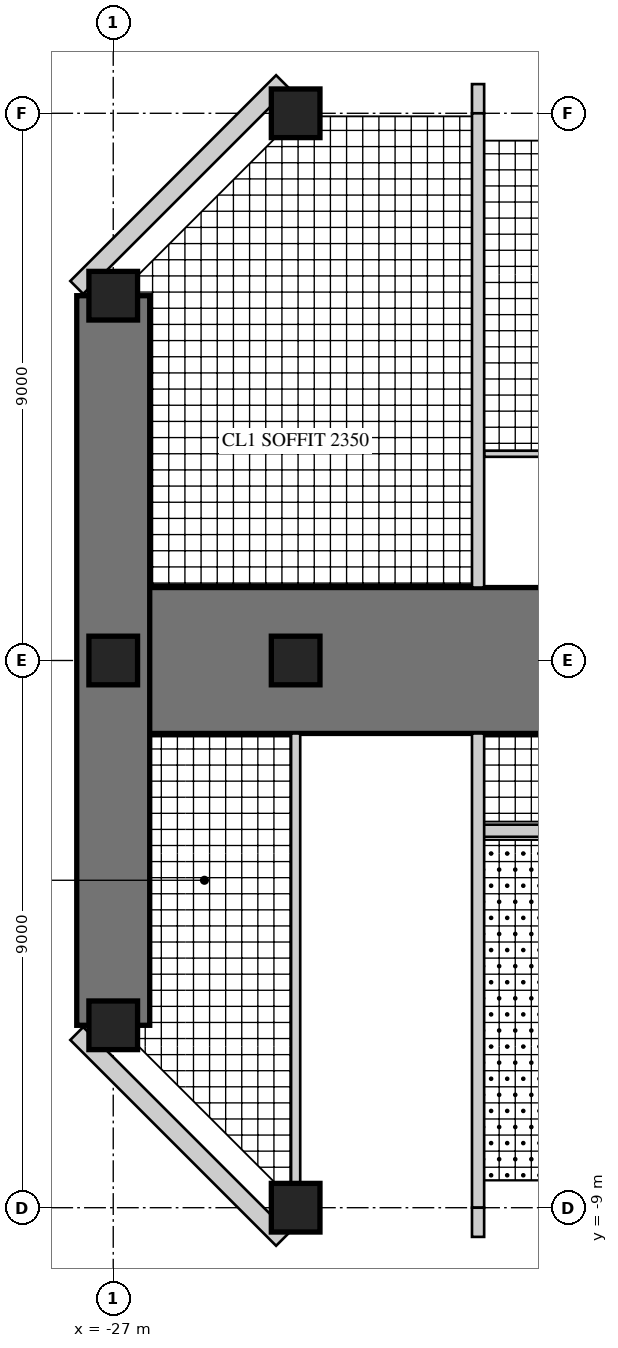
"""IFC4 building model, lengths in metres.
Left out: names, types, materials, properties, quantities, classifications, styles, units other than length and angle.
Written with IfcOpenShell. Run it as: python <this file> out.ifc"""

import sys

from ifc_helpers import new_model, si_unit, direction, frame, frame_2d, origin, origin_2d, place, context, subcontext, project, spatial, rectangle, hollow_rectangle, extrude, element, fill, save


model = new_model("IFC4")
c1 = context("Model", 3, precision=1e-05, world=origin(), true_north=direction((0.0, 1.0)))
c2 = subcontext(c1, "Body", "Model", "MODEL_VIEW")
j1 = project(units=[si_unit("LENGTHUNIT", "METRE"), si_unit("PLANEANGLEUNIT", "RADIAN")], contexts=[c1])
p1 = place(None, origin())
s1 = spatial("IfcSite", under=j1, at=p1, CompositionType="ELEMENT")
p2 = place(p1, origin())
s2 = spatial("IfcBuilding", under=s1, at=p2, CompositionType="ELEMENT")
p3 = place(p2, frame((0.0, 0.0, 242.5)))
s3 = spatial("IfcBuildingStorey", under=s2, at=p3, CompositionType="ELEMENT", Elevation=242.5)
p4 = place(p3, frame((-13.05, 0.0, 0.0), z_axis=(0.0, 0.0, 1.0), x_axis=(-1.0, 0.0, 0.0)))
e1 = element("IfcWall", 1, at=p4, inside=s3, PredefinedType="SHEAR", context=c2, shape_type="SweptSolid", body=[
    extrude(rectangle(XDim=13.95, YDim=2.4, at=frame_2d((6.975, 0.0))), origin(), (0.0, 0.0, 1.0), 3.4),
])
p5 = place(p4, frame((0.3, 0.0, 0.0)))
e2 = element("IfcOpeningElement", 2, at=p5, cuts=e1, PredefinedType="OPENING", context=c2, shape_type="SweptSolid", body=[
    extrude(rectangle(XDim=1.0, YDim=2.15, at=frame_2d((0.5, 1.075))), frame((0.0, 1.21, 0.0), z_axis=(0.0, -1.0, 0.0), x_axis=(1.0, 0.0, 0.0)), (0.0, 0.0, 1.0), 2.42),
])
p6 = place(p4, frame((2.55, 0.0, 0.0)))
e3 = element("IfcOpeningElement", 3, at=p6, cuts=e1, PredefinedType="OPENING", context=c2, shape_type="SweptSolid", body=[
    extrude(rectangle(XDim=1.0, YDim=2.15, at=frame_2d((0.5, 1.075))), frame((0.0, 1.21, 0.0), z_axis=(0.0, -1.0, 0.0), x_axis=(1.0, 0.0, 0.0)), (0.0, 0.0, 1.0), 2.42),
])
p7 = place(p4, frame((9.25, 0.0, 0.0)))
e4 = element("IfcOpeningElement", 4, at=p7, cuts=e1, PredefinedType="OPENING", context=c2, shape_type="SweptSolid", body=[
    extrude(rectangle(XDim=1.0, YDim=2.2, at=frame_2d((0.5, 1.1))), frame((0.0, 1.21, 0.0), z_axis=(0.0, -1.0, 0.0), x_axis=(1.0, 0.0, 0.0)), (0.0, 0.0, 1.0), 2.42),
])
p8 = place(p3, frame((-27.0, 6.0, 0.0), z_axis=(0.0, 0.0, 1.0), x_axis=(0.0, -1.0, 0.0)))
e5 = element("IfcWall", 5, at=p8, inside=s3, PredefinedType="SHEAR", context=c2, shape_type="SweptSolid", body=[
    extrude(rectangle(XDim=12.0, YDim=1.2, at=frame_2d((6.0, 0.0))), origin(), (0.0, 0.0, 1.0), 3.4),
])
p9 = place(p8, frame((1.2, 0.0, 0.6)))
e6 = element("IfcOpeningElement", 6, at=p9, cuts=e5, PredefinedType="OPENING", context=c2, shape_type="SweptSolid", body=[
    extrude(rectangle(XDim=3.0, YDim=2.4, at=frame_2d((1.5, 1.2))), frame((0.0, 0.61, 0.0), z_axis=(0.0, -1.0, 0.0), x_axis=(1.0, 0.0, 0.0)), (0.0, 0.0, 1.0), 1.22),
])
p10 = place(p8, frame((7.8, 0.0, 0.6)))
e7 = element("IfcOpeningElement", 7, at=p10, cuts=e5, PredefinedType="OPENING", context=c2, shape_type="SweptSolid", body=[
    extrude(rectangle(XDim=3.0, YDim=2.4, at=frame_2d((1.5, 1.2))), frame((0.0, 0.61, 0.0), z_axis=(0.0, -1.0, 0.0), x_axis=(1.0, 0.0, 0.0)), (0.0, 0.0, 1.0), 1.22),
])
for number, where, z_axis, x_axis in (
    (8, (-24.0, 9.0, 0.0), (0.0, 0.0, 1.0), (1.0, 0.0, 0.0)),
    (9, (-24.0, -9.0, 0.0), (0.0, 0.0, 1.0), (1.0, 0.0, 0.0)),
    (10, (-27.0, 6.0, 0.0), (0.0, 0.0, 1.0), (1.0, 0.0, 0.0)),
    (11, (-27.0, 0.0, 0.0), (0.0, 0.0, 1.0), (1.0, 0.0, 0.0)),
    (12, (-27.0, -6.0, 0.0), (0.0, 0.0, 1.0), (1.0, 0.0, 0.0)),
    (13, (-24.0, 0.0, 0.0), (0.0, 0.0, 1.0), (1.0, 0.0, 0.0)),
):
    element("IfcColumn", number, at=place(p3, frame(where, z_axis=z_axis, x_axis=x_axis)), inside=s3, PredefinedType="COLUMN", context=c2, shape_type="SweptSolid", body=[
        extrude(rectangle(XDim=0.8, YDim=0.8, at=origin_2d()), origin(), (0.0, 0.0, 1.0), 3.4),
    ])
p11 = place(p3, frame((-24.215, 9.52, 0.0), z_axis=(0.0, 0.0, 1.0), x_axis=(-0.707132283189, -0.707081278264, 0.0)))
e14 = element("IfcWall", 14, at=p11, inside=s3, PredefinedType="SOLIDWALL", context=c2, shape_type="SweptSolid", body=[
    extrude(rectangle(XDim=4.787, YDim=0.3, at=frame_2d((2.393, 0.0))), origin(), (0.0, 0.0, 1.0), 3.22),
])
p12 = place(p11, frame((1.943, 0.0, 0.3)))
e15 = element("IfcOpeningElement", 15, at=p12, cuts=e14, PredefinedType="OPENING", context=c2, shape_type="SweptSolid", body=[
    extrude(rectangle(XDim=0.9, YDim=2.4, at=frame_2d((0.45, 1.2))), frame((0.0, 0.16, 0.0), z_axis=(0.0, -1.0, 0.0), x_axis=(1.0, 0.0, 0.0)), (0.0, 0.0, 1.0), 0.32),
])
p13 = place(p3, frame((-27.6, -6.135, 0.0), z_axis=(0.0, 0.0, 1.0), x_axis=(0.707132283189, -0.707081278264, 0.0)))
e16 = element("IfcWall", 16, at=p13, inside=s3, PredefinedType="SOLIDWALL", context=c2, shape_type="SweptSolid", body=[
    extrude(rectangle(XDim=4.787, YDim=0.3, at=frame_2d((2.393, 0.0))), origin(), (0.0, 0.0, 1.0), 3.22),
])
p14 = place(p13, frame((1.943, 0.0, 0.3)))
e17 = element("IfcOpeningElement", 17, at=p14, cuts=e16, PredefinedType="OPENING", context=c2, shape_type="SweptSolid", body=[
    extrude(rectangle(XDim=0.9, YDim=2.4, at=frame_2d((0.45, 1.2))), frame((0.0, 0.16, 0.0), z_axis=(0.0, -1.0, 0.0), x_axis=(1.0, 0.0, 0.0)), (0.0, 0.0, 1.0), 0.32),
])
p15 = place(p3, frame((-18.4, 3.4, 0.0), z_axis=(0.0, 0.0, 1.0), x_axis=(-1.0, 0.0, 0.0)))
e18 = element("IfcWall", 18, at=p15, inside=s3, PredefinedType="PARTITIONING", context=c2, shape_type="SweptSolid", body=[
    extrude(rectangle(XDim=2.5, YDim=0.1, at=frame_2d((1.25, 0.0))), origin(), (0.0, 0.0, 1.0), 3.22),
])
p16 = place(p3, frame((-9.4, -2.8, 0.0), z_axis=(0.0, 0.0, 1.0), x_axis=(-1.0, 0.0, 0.0)))
e19 = element("IfcWall", 19, at=p16, inside=s3, PredefinedType="SOLIDWALL", context=c2, shape_type="SweptSolid", body=[
    extrude(rectangle(XDim=11.6, YDim=0.2, at=frame_2d((5.8, 0.0))), origin(), (0.0, 0.0, 1.0), 3.22),
])
p17 = place(p16, frame((3.4, 0.0, 0.0)))
e20 = element("IfcOpeningElement", 20, at=p17, cuts=e19, PredefinedType="OPENING", context=c2, shape_type="SweptSolid", body=[
    extrude(rectangle(XDim=1.0, YDim=2.15, at=frame_2d((0.5, 1.075))), frame((0.0, 0.11, 0.0), z_axis=(0.0, -1.0, 0.0), x_axis=(1.0, 0.0, 0.0)), (0.0, 0.0, 1.0), 0.22),
])
p18 = place(p16, frame((6.8, 0.0, 0.0)))
e21 = element("IfcOpeningElement", 21, at=p18, cuts=e19, PredefinedType="OPENING", context=c2, shape_type="SweptSolid", body=[
    extrude(rectangle(XDim=1.0, YDim=2.2, at=frame_2d((0.5, 1.1))), frame((0.0, 0.11, 0.0), z_axis=(0.0, -1.0, 0.0), x_axis=(1.0, 0.0, 0.0)), (0.0, 0.0, 1.0), 0.22),
])
p19 = place(p3, frame((-24.0, -1.2, 0.0), z_axis=(0.0, 0.0, 1.0), x_axis=(0.0, -1.0, 0.0)))
e22 = element("IfcWall", 22, at=p19, inside=s3, PredefinedType="PARTITIONING", context=c2, shape_type="SweptSolid", body=[
    extrude(rectangle(XDim=7.4, YDim=0.15, at=frame_2d((3.7, 0.0))), origin(), (0.0, 0.0, 1.0), 2.52),
])
p20 = place(p19, frame((1.2, 0.0, 0.0)))
e23 = element("IfcOpeningElement", 23, at=p20, cuts=e22, PredefinedType="OPENING", context=c2, shape_type="SweptSolid", body=[
    extrude(rectangle(XDim=1.0, YDim=2.2, at=frame_2d((0.5, 1.1))), frame((0.0, 0.085, 0.0), z_axis=(0.0, -1.0, 0.0), x_axis=(1.0, 0.0, 0.0)), (0.0, 0.0, 1.0), 0.17),
])
p21 = place(p3, frame((-21.0, 9.48, 0.0), z_axis=(0.0, 0.0, 1.0), x_axis=(0.0, -1.0, 0.0)))
e24 = element("IfcWall", 24, at=p21, inside=s3, PredefinedType="SOLIDWALL", context=c2, shape_type="SweptSolid", body=[
    extrude(rectangle(XDim=0.48, YDim=0.2, at=frame_2d((0.24, 0.0))), origin(), (0.0, 0.0, 1.0), 3.22),
])
p22 = place(p3, frame((-21.0, 9.0, 0.0), z_axis=(0.0, 0.0, 1.0), x_axis=(0.0, -1.0, 0.0)))
e25 = element("IfcWall", 25, at=p22, inside=s3, PredefinedType="SOLIDWALL", context=c2, shape_type="SweptSolid", body=[
    extrude(rectangle(XDim=7.8, YDim=0.2, at=frame_2d((3.9, 0.0))), origin(), (0.0, 0.0, 1.0), 2.67),
])
p23 = place(p3, frame((-21.0, -1.2, 0.0), z_axis=(0.0, 0.0, 1.0), x_axis=(0.0, -1.0, 0.0)))
e26 = element("IfcWall", 26, at=p23, inside=s3, PredefinedType="SOLIDWALL", context=c2, shape_type="SweptSolid", body=[
    extrude(rectangle(XDim=7.8, YDim=0.2, at=frame_2d((3.9, 0.0))), origin(), (0.0, 0.0, 1.0), 2.67),
])
p24 = place(p23, frame((0.35, 0.0, 0.0)))
e27 = element("IfcOpeningElement", 27, at=p24, cuts=e26, PredefinedType="OPENING", context=c2, shape_type="SweptSolid", body=[
    extrude(rectangle(XDim=1.0, YDim=2.2, at=frame_2d((0.5, 1.1))), frame((0.0, 0.11, 0.0), z_axis=(0.0, -1.0, 0.0), x_axis=(1.0, 0.0, 0.0)), (0.0, 0.0, 1.0), 0.22),
])
p25 = place(p3, frame((-21.0, -9.0, 0.0), z_axis=(0.0, 0.0, 1.0), x_axis=(0.0, -1.0, 0.0)))
e28 = element("IfcWall", 28, at=p25, inside=s3, PredefinedType="SOLIDWALL", context=c2, shape_type="SweptSolid", body=[
    extrude(rectangle(XDim=0.48, YDim=0.2, at=frame_2d((0.24, 0.0))), origin(), (0.0, 0.0, 1.0), 3.22),
])
p26 = place(p12, origin())
e29 = element("IfcWindow", 29, at=p26, inside=s3, PartitioningType="SINGLE_PANEL", PredefinedType="WINDOW", context=c2, shape_type="SweptSolid", body=[
    extrude(hollow_rectangle(XDim=0.9, YDim=2.4, WallThickness=0.06, at=frame_2d((0.45, 1.2))), frame((0.0, 0.03, 0.0), z_axis=(0.0, -1.0, 0.0), x_axis=(1.0, 0.0, 0.0)), (0.0, 0.0, 1.0), 0.06),
    extrude(rectangle(XDim=0.779, YDim=2.279, at=frame_2d((0.45, 1.2))), frame((0.0, 0.03, 0.0), z_axis=(0.0, -1.0, 0.0), x_axis=(1.0, 0.0, 0.0)), (0.0, 0.0, 1.0), 0.06),
])
fill(e15, e29)
p27 = place(p9, origin())
e30 = element("IfcWindow", 30, at=p27, inside=s3, PartitioningType="SINGLE_PANEL", PredefinedType="WINDOW", context=c2, shape_type="SweptSolid", body=[
    extrude(hollow_rectangle(XDim=3.0, YDim=2.4, WallThickness=0.06, at=frame_2d((1.5, 1.2))), frame((0.0, 0.03, 0.0), z_axis=(0.0, -1.0, 0.0), x_axis=(1.0, 0.0, 0.0)), (0.0, 0.0, 1.0), 0.06),
    extrude(rectangle(XDim=2.879, YDim=2.279, at=frame_2d((1.5, 1.2))), frame((0.0, 0.03, 0.0), z_axis=(0.0, -1.0, 0.0), x_axis=(1.0, 0.0, 0.0)), (0.0, 0.0, 1.0), 0.06),
])
fill(e6, e30)
p28 = place(p10, origin())
e31 = element("IfcWindow", 31, at=p28, inside=s3, PartitioningType="SINGLE_PANEL", PredefinedType="WINDOW", context=c2, shape_type="SweptSolid", body=[
    extrude(hollow_rectangle(XDim=3.0, YDim=2.4, WallThickness=0.06, at=frame_2d((1.5, 1.2))), frame((0.0, 0.03, 0.0), z_axis=(0.0, -1.0, 0.0), x_axis=(1.0, 0.0, 0.0)), (0.0, 0.0, 1.0), 0.06),
    extrude(rectangle(XDim=2.879, YDim=2.279, at=frame_2d((1.5, 1.2))), frame((0.0, 0.03, 0.0), z_axis=(0.0, -1.0, 0.0), x_axis=(1.0, 0.0, 0.0)), (0.0, 0.0, 1.0), 0.06),
])
fill(e7, e31)
p29 = place(p14, origin())
e32 = element("IfcWindow", 32, at=p29, inside=s3, PartitioningType="SINGLE_PANEL", PredefinedType="WINDOW", context=c2, shape_type="SweptSolid", body=[
    extrude(hollow_rectangle(XDim=0.9, YDim=2.4, WallThickness=0.06, at=frame_2d((0.45, 1.2))), frame((0.0, 0.03, 0.0), z_axis=(0.0, -1.0, 0.0), x_axis=(1.0, 0.0, 0.0)), (0.0, 0.0, 1.0), 0.06),
    extrude(rectangle(XDim=0.779, YDim=2.279, at=frame_2d((0.45, 1.2))), frame((0.0, 0.03, 0.0), z_axis=(0.0, -1.0, 0.0), x_axis=(1.0, 0.0, 0.0)), (0.0, 0.0, 1.0), 0.06),
])
fill(e17, e32)
p30 = place(p20, frame((1.0, 0.0, 0.0), z_axis=(0.0, 0.0, 1.0), x_axis=(-1.0, 0.0, 0.0)))
e33 = element("IfcDoor", 33, at=p30, inside=s3, OperationType="SINGLE_SWING_RIGHT", PredefinedType="DOOR", context=c2, shape_type="SweptSolid", body=[
    extrude(rectangle(XDim=1.0, YDim=2.2, at=frame_2d((0.5, 1.1))), frame((0.0, 0.025, 0.0), z_axis=(0.0, -1.0, 0.0), x_axis=(1.0, 0.0, 0.0)), (0.0, 0.0, 1.0), 0.05),
])
fill(e23, e33)
p31 = place(p24, frame((1.0, 0.0, 0.0), z_axis=(0.0, 0.0, 1.0), x_axis=(-1.0, 0.0, 0.0)))
e34 = element("IfcDoor", 34, at=p31, inside=s3, OperationType="SINGLE_SWING_RIGHT", PredefinedType="DOOR", context=c2, shape_type="SweptSolid", body=[
    extrude(rectangle(XDim=1.0, YDim=2.2, at=frame_2d((0.5, 1.1))), frame((0.0, 0.025, 0.0), z_axis=(0.0, -1.0, 0.0), x_axis=(1.0, 0.0, 0.0)), (0.0, 0.0, 1.0), 0.05),
])
fill(e27, e34)
p32 = place(p7, origin())
e35 = element("IfcDoor", 35, at=p32, inside=s3, OperationType="SINGLE_SWING_RIGHT", PredefinedType="DOOR", context=c2, shape_type="SweptSolid", body=[
    extrude(rectangle(XDim=1.0, YDim=2.2, at=frame_2d((0.5, 1.1))), frame((0.0, 0.025, 0.0), z_axis=(0.0, -1.0, 0.0), x_axis=(1.0, 0.0, 0.0)), (0.0, 0.0, 1.0), 0.05),
])
fill(e4, e35)
save(model, sys.argv[1])
